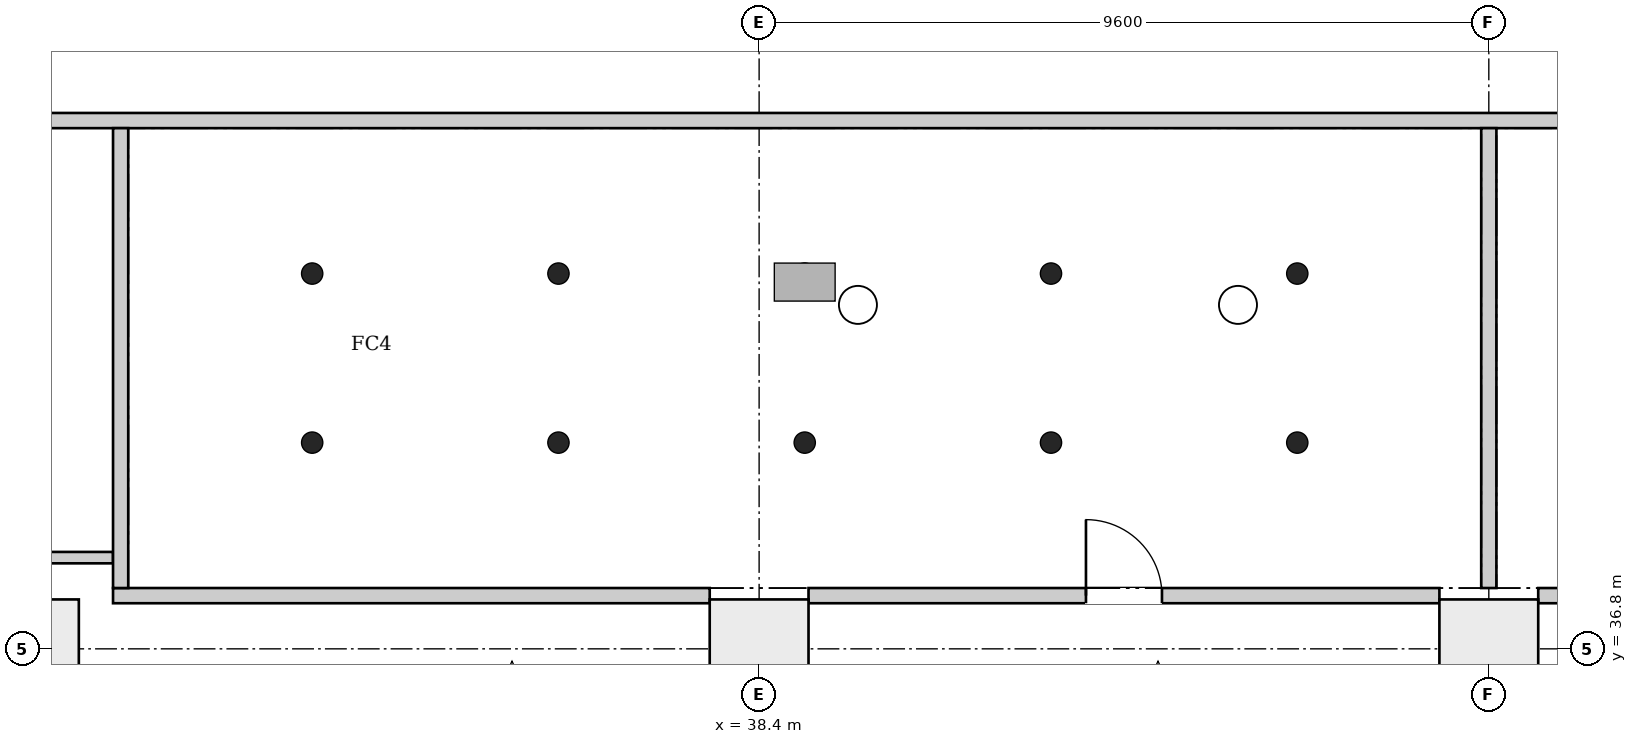
"""IFC4 building model, lengths in metres.
Left out: names, types, materials, properties, quantities, classifications, styles, units other than length and angle.
Written with IfcOpenShell. Run it as: python <this file> out.ifc"""

import sys

from ifc_helpers import new_model, si_unit, direction, frame, frame_2d, origin, origin_2d, place, context, subcontext, project, spatial, rectangle, extrude, element, fill, save


model = new_model("IFC4")
c1 = context("Model", 3, precision=1e-05, world=origin(), true_north=direction((0.0, 1.0)))
c2 = subcontext(c1, "Body", "Model", "MODEL_VIEW")
j1 = project(units=[si_unit("LENGTHUNIT", "METRE"), si_unit("PLANEANGLEUNIT", "RADIAN")], contexts=[c1])
p1 = place(None, origin())
s1 = spatial("IfcSite", under=j1, at=p1, CompositionType="ELEMENT")
p2 = place(p1, origin())
s2 = spatial("IfcBuilding", under=s1, at=p2, CompositionType="ELEMENT")
p3 = place(p2, frame((0.0, 0.0, 6.5)))
s3 = spatial("IfcBuildingStorey", under=s2, at=p3, CompositionType="ELEMENT", Elevation=6.5)
for number, where, z_axis, x_axis in (
    (1, (28.8, 36.8, 0.0), (0.0, 0.0, 1.0), (1.0, 0.0, 0.0)),
    (2, (38.4, 36.8, 0.0), (0.0, 0.0, 1.0), (1.0, 0.0, 0.0)),
    (3, (48.0, 36.8, 0.0), (0.0, 0.0, 1.0), (1.0, 0.0, 0.0)),
):
    element("IfcColumn", number, at=place(p3, frame(where, z_axis=z_axis, x_axis=x_axis)), inside=s3, PredefinedType="COLUMN", context=c2, shape_type="SweptSolid", body=[
        extrude(rectangle(XDim=1.3, YDim=1.3, at=origin_2d()), origin(), (0.0, 0.0, 1.0), 7.7),
    ])
p4 = place(p3, frame((28.006, 38.0, 0.0), z_axis=(0.0, 0.0, 1.0), x_axis=(1.0, 0.0, 0.0)))
e4 = element("IfcWall", 4, at=p4, inside=s3, PredefinedType="PARTITIONING", context=c2, shape_type="SweptSolid", body=[
    extrude(rectangle(XDim=1.894, YDim=0.15, at=frame_2d((0.947, 0.0))), origin(), (0.0, 0.0, 1.0), 7.35),
])
p5 = place(p3, frame((28.006, 43.75, 0.0), z_axis=(0.0, 0.0, 1.0), x_axis=(1.0, 0.0, 0.0)))
e5 = element("IfcWall", 5, at=p5, inside=s3, PredefinedType="PARTITIONING", context=c2, shape_type="SweptSolid", body=[
    extrude(rectangle(XDim=29.388, YDim=0.2, at=frame_2d((14.694, 0.0))), origin(), (0.0, 0.0, 1.0), 7.35),
])
p6 = place(p3, frame((29.9, 37.5, 0.0), z_axis=(0.0, 0.0, 1.0), x_axis=(1.0, 0.0, 0.0)))
e6 = element("IfcWall", 6, at=p6, inside=s3, PredefinedType="PARTITIONING", context=c2, shape_type="SweptSolid", body=[
    extrude(rectangle(XDim=7.85, YDim=0.2, at=frame_2d((3.925, 0.0))), origin(), (0.0, 0.0, 1.0), 7.35),
])
p7 = place(p3, frame((30.0, 37.6, 0.0), z_axis=(0.0, 0.0, 1.0), x_axis=(0.0, 1.0, 0.0)))
e7 = element("IfcWall", 7, at=p7, inside=s3, PredefinedType="PARTITIONING", context=c2, shape_type="SweptSolid", body=[
    extrude(rectangle(XDim=6.05, YDim=0.2, at=frame_2d((3.025, 0.0))), origin(), (0.0, 0.0, 1.0), 7.35),
])
p8 = place(p3, frame((39.05, 37.5, 0.0), z_axis=(0.0, 0.0, 1.0), x_axis=(1.0, 0.0, 0.0)))
e8 = element("IfcWall", 8, at=p8, inside=s3, PredefinedType="PARTITIONING", context=c2, shape_type="SweptSolid", body=[
    extrude(rectangle(XDim=8.3, YDim=0.2, at=frame_2d((4.15, 0.0))), origin(), (0.0, 0.0, 1.0), 7.35),
])
p9 = place(p8, frame((3.65, 0.0, 0.0)))
e9 = element("IfcOpeningElement", 9, at=p9, cuts=e8, PredefinedType="OPENING", context=c2, shape_type="SweptSolid", body=[
    extrude(rectangle(XDim=1.0, YDim=2.1, at=frame_2d((0.5, 1.05))), frame((0.0, 0.11, 0.0), z_axis=(0.0, -1.0, 0.0), x_axis=(1.0, 0.0, 0.0)), (0.0, 0.0, 1.0), 0.22),
])
p10 = place(p3, frame((48.0, 37.6, 0.0), z_axis=(0.0, 0.0, 1.0), x_axis=(0.0, 1.0, 0.0)))
e10 = element("IfcWall", 10, at=p10, inside=s3, PredefinedType="PARTITIONING", context=c2, shape_type="SweptSolid", body=[
    extrude(rectangle(XDim=6.05, YDim=0.2, at=frame_2d((3.025, 0.0))), origin(), (0.0, 0.0, 1.0), 6.95),
])
p11 = place(p3, frame((48.65, 37.5, 0.0), z_axis=(0.0, 0.0, 1.0), x_axis=(1.0, 0.0, 0.0)))
e11 = element("IfcWall", 11, at=p11, inside=s3, PredefinedType="PARTITIONING", context=c2, shape_type="SweptSolid", body=[
    extrude(rectangle(XDim=8.744, YDim=0.2, at=frame_2d((4.372, 0.0))), origin(), (0.0, 0.0, 1.0), 7.35),
])
p12 = place(p11, frame((3.872, 0.0, 0.0)))
e12 = element("IfcOpeningElement", 12, at=p12, cuts=e11, PredefinedType="OPENING", context=c2, shape_type="SweptSolid", body=[
    extrude(rectangle(XDim=1.0, YDim=2.1, at=frame_2d((0.5, 1.05))), frame((0.0, 0.11, 0.0), z_axis=(0.0, -1.0, 0.0), x_axis=(1.0, 0.0, 0.0)), (0.0, 0.0, 1.0), 0.22),
])
p13 = place(p9, origin())
e13 = element("IfcDoor", 13, at=p13, inside=s3, OperationType="SINGLE_SWING_LEFT", PredefinedType="DOOR", context=c2, shape_type="SweptSolid", body=[
    extrude(rectangle(XDim=1.0, YDim=2.1, at=frame_2d((0.5, 1.05))), frame((0.0, 0.025, 0.0), z_axis=(0.0, -1.0, 0.0), x_axis=(1.0, 0.0, 0.0)), (0.0, 0.0, 1.0), 0.05),
])
fill(e9, e13)
save(model, sys.argv[1])
